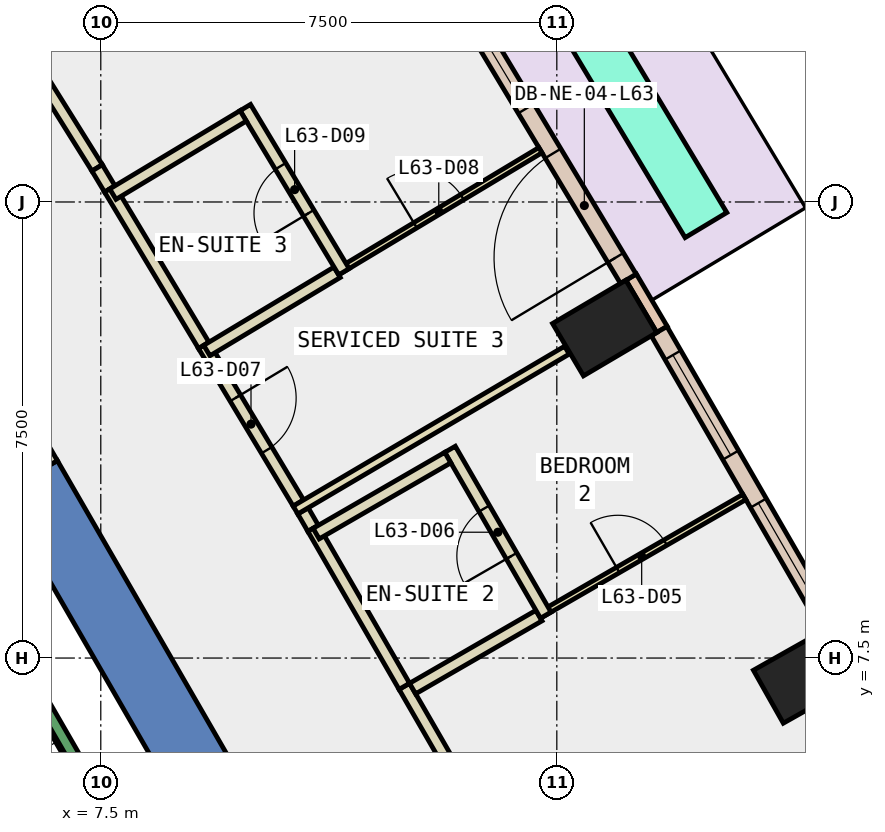
"""IFC4 building model, lengths in metres.
Left out: names, types, materials, properties, quantities, classifications, styles, units other than length and angle.
Written with IfcOpenShell. Run it as: python <this file> out.ifc"""

import sys

from ifc_helpers import new_model, si_unit, direction, frame, frame_2d, origin, origin_2d, place, context, subcontext, project, spatial, polyline, rectangle, outline, extrude, element, fill, save


model = new_model("IFC4")
c1 = context("Model", 3, precision=1e-05, world=origin(), true_north=direction((0.0, 1.0)))
c2 = subcontext(c1, "Body", "Model", "MODEL_VIEW")
j1 = project(units=[si_unit("LENGTHUNIT", "METRE"), si_unit("PLANEANGLEUNIT", "RADIAN")], contexts=[c1])
p1 = place(None, origin())
s1 = spatial("IfcSite", under=j1, at=p1, CompositionType="ELEMENT")
p2 = place(p1, origin())
s2 = spatial("IfcBuilding", under=s1, at=p2, CompositionType="ELEMENT")
p3 = place(p2, frame((0.0, 0.0, 273.8)))
s3 = spatial("IfcBuildingStorey", under=s2, at=p3, CompositionType="ELEMENT", Elevation=273.8)
for number, where, z_axis, x_axis in (
    (1, (19.089, 7.208, -0.34), (0.0, 0.0, 1.0), (-0.491, 0.871, 0.0)),
    (2, (15.787, 12.927, -0.34), (0.0, 0.0, 1.0), (-0.509, 0.861, 0.0)),
):
    element("IfcColumn", number, at=place(p3, frame(where, z_axis=z_axis, x_axis=x_axis)), inside=s3, PredefinedType="COLUMN", context=c2, shape_type="SweptSolid", body=[
        extrude(rectangle(XDim=1.0, YDim=1.4, at=origin_2d()), origin(), (0.0, 0.0, 1.0), 3.6),
    ])
p4 = place(p3, frame((0.0, 0.0, -0.34)))
e3 = element("IfcWall", 3, at=p4, inside=s3, PredefinedType="SHEAR", context=c2, shape_type="SweptSolid", body=[
    extrude(outline(polyline([(6.786, 10.747), (5.833, 10.197), (10.277, 2.5), (11.547, 2.5), (6.786, 10.747)])), origin(), (0.0, 0.0, 1.0), 3.6),
])
p5 = place(p3, frame((16.73, 12.904, 0.0), z_axis=(0.0, 0.0, 1.0), x_axis=(-0.508268432768, 0.861198699634, 0.0)))
e4 = element("IfcWall", 4, at=p5, inside=s3, PredefinedType="STANDARD", context=c2, shape_type="SweptSolid", body=[
    extrude(rectangle(XDim=1.0, YDim=0.2, at=frame_2d((0.5, 0.0))), origin(), (0.0, 0.0, 1.0), 3.26),
])
p6 = place(p3, frame((19.493, 8.008, 0.0), z_axis=(0.0, 0.0, 1.0), x_axis=(-0.49999685976, 0.866027216796, 0.0)))
e5 = element("IfcWall", 5, at=p6, inside=s3, PredefinedType="STANDARD", context=c2, shape_type="SweptSolid", body=[
    extrude(rectangle(XDim=5.622, YDim=0.3, at=frame_2d((2.811, 0.0))), origin(), (0.0, 0.0, 1.0), 3.26),
])
p7 = place(p6, frame((0.456, 0.0, 0.9)))
e6 = element("IfcOpeningElement", 6, at=p7, cuts=e5, PredefinedType="OPENING", context=c2, shape_type="SweptSolid", body=[
    extrude(rectangle(XDim=1.9, YDim=2.0, at=frame_2d((0.95, 1.0))), frame((0.0, 0.16, 0.0), z_axis=(0.0, -1.0, 0.0), x_axis=(1.0, 0.0, 0.0)), (0.0, 0.0, 1.0), 0.32),
])
p8 = place(p6, frame((3.267, 0.0, 0.9)))
e7 = element("IfcOpeningElement", 7, at=p8, cuts=e5, PredefinedType="OPENING", context=c2, shape_type="SweptSolid", body=[
    extrude(rectangle(XDim=1.9, YDim=2.0, at=frame_2d((0.95, 1.0))), frame((0.0, 0.16, 0.0), z_axis=(0.0, -1.0, 0.0), x_axis=(1.0, 0.0, 0.0)), (0.0, 0.0, 1.0), 0.32),
])
p9 = place(p3, frame((16.176, 13.737, 0.0), z_axis=(0.0, 0.0, 1.0), x_axis=(-0.515006791362, 0.857186096977, 0.0)))
e8 = element("IfcWall", 8, at=p9, inside=s3, PredefinedType="STANDARD", context=c2, shape_type="SweptSolid", body=[
    extrude(rectangle(XDim=5.619, YDim=0.3, at=frame_2d((2.81, 0.0))), origin(), (0.0, 0.0, 1.0), 3.26),
])
p10 = place(p9, frame((0.405, 0.0, 0.0)))
e9 = element("IfcOpeningElement", 9, at=p10, cuts=e8, PredefinedType="OPENING", context=c2, shape_type="SweptSolid", body=[
    extrude(rectangle(XDim=2.0, YDim=2.4, at=frame_2d((1.0, 1.2))), frame((0.0, 0.16, 0.0), z_axis=(0.0, -1.0, 0.0), x_axis=(1.0, 0.0, 0.0)), (0.0, 0.0, 1.0), 0.32),
])
p11 = place(p9, frame((3.265, 0.0, 0.9)))
e10 = element("IfcOpeningElement", 10, at=p11, cuts=e8, PredefinedType="OPENING", context=c2, shape_type="SweptSolid", body=[
    extrude(rectangle(XDim=1.9, YDim=2.0, at=frame_2d((0.95, 1.0))), frame((0.0, 0.16, 0.0), z_axis=(0.0, -1.0, 0.0), x_axis=(1.0, 0.0, 0.0)), (0.0, 0.0, 1.0), 0.32),
])
p12 = place(p3, frame((17.453, 14.62, 0.0), z_axis=(0.0, 0.0, 1.0), x_axis=(-0.514846755633, 0.857282227865, 0.0)))
e11 = element("IfcWall", 11, at=p12, inside=s3, PredefinedType="STANDARD", context=c2, shape_type="SweptSolid", body=[
    extrude(rectangle(XDim=5.421, YDim=0.8, at=frame_2d((2.71, 0.0))), origin(), (0.0, 0.0, 1.0), 0.8),
])
p13 = place(p3, frame((12.492, 7.035, 0.0), z_axis=(0.0, 0.0, 1.0), x_axis=(0.49999285859, -0.86602952684, 0.0)))
e12 = element("IfcWall", 12, at=p13, inside=s3, PredefinedType="PARTITIONING", context=c2, shape_type="SweptSolid", body=[
    extrude(rectangle(XDim=3.1, YDim=0.2, at=frame_2d((1.55, 0.0))), origin(), (0.0, 0.0, 1.0), 3.26),
])
p14 = place(p3, frame((10.826, 9.92, 0.0), z_axis=(0.0, 0.0, 1.0), x_axis=(0.5008910821, -0.865510325688, 0.0)))
e13 = element("IfcWall", 13, at=p14, inside=s3, PredefinedType="PARTITIONING", context=c2, shape_type="SweptSolid", body=[
    extrude(rectangle(XDim=0.332, YDim=0.2, at=frame_2d((0.166, 0.0))), origin(), (0.0, 0.0, 1.0), 3.26),
])
p15 = place(p3, frame((10.992, 9.633, 0.0), z_axis=(0.0, 0.0, 1.0), x_axis=(0.499990139034, -0.866031096941, 0.0)))
e14 = element("IfcWall", 14, at=p15, inside=s3, PredefinedType="PARTITIONING", context=c2, shape_type="SweptSolid", body=[
    extrude(rectangle(XDim=3.0, YDim=0.2, at=frame_2d((1.5, 0.0))), origin(), (0.0, 0.0, 1.0), 3.26),
])
p16 = place(p3, frame((9.192, 12.643, 0.0), z_axis=(0.0, 0.0, 1.0), x_axis=(0.51491096884, -0.857243660909, 0.0)))
e15 = element("IfcWall", 15, at=p16, inside=s3, PredefinedType="PARTITIONING", context=c2, shape_type="SweptSolid", body=[
    extrude(rectangle(XDim=3.026, YDim=0.2, at=frame_2d((1.513, 0.0))), origin(), (0.0, 0.0, 1.0), 3.26),
])
p17 = place(p16, frame((1.012, 0.0, 0.0)))
e16 = element("IfcOpeningElement", 16, at=p17, cuts=e15, PredefinedType="OPENING", context=c2, shape_type="SweptSolid", body=[
    extrude(rectangle(XDim=1.0, YDim=2.1, at=frame_2d((0.5, 1.05))), frame((0.0, 0.11, 0.0), z_axis=(0.0, -1.0, 0.0), x_axis=(1.0, 0.0, 0.0)), (0.0, 0.0, 1.0), 0.22),
])
p18 = place(p3, frame((4.085, 20.929, 0.0), z_axis=(0.0, 0.0, 1.0), x_axis=(0.530002406791, -0.847996137253, 0.0)))
e17 = element("IfcWall", 17, at=p18, inside=s3, PredefinedType="PARTITIONING", context=c2, shape_type="SweptSolid", body=[
    extrude(rectangle(XDim=6.33, YDim=0.2, at=frame_2d((3.165, 0.0))), origin(), (0.0, 0.0, 1.0), 3.26),
])
p19 = place(p3, frame((7.44, 15.561, 0.0), z_axis=(0.0, 0.0, 1.0), x_axis=(0.514229456049, -0.857652649114, 0.0)))
e18 = element("IfcWall", 18, at=p19, inside=s3, PredefinedType="PARTITIONING", context=c2, shape_type="SweptSolid", body=[
    extrude(rectangle(XDim=0.405, YDim=0.2, at=frame_2d((0.202, 0.0))), origin(), (0.0, 0.0, 1.0), 3.26),
])
p20 = place(p3, frame((7.648, 15.214, 0.0), z_axis=(0.0, 0.0, 1.0), x_axis=(0.515118014871, -0.857119262854, 0.0)))
e19 = element("IfcWall", 19, at=p20, inside=s3, PredefinedType="PARTITIONING", context=c2, shape_type="SweptSolid", body=[
    extrude(rectangle(XDim=3.0, YDim=0.2, at=frame_2d((1.5, 0.0))), origin(), (0.0, 0.0, 1.0), 3.26),
])
p21 = place(p3, frame((14.707, 8.198, 0.0), z_axis=(0.0, 0.0, 1.0), x_axis=(0.865995823051, 0.500051231833, 0.0)))
e20 = element("IfcWall", 20, at=p21, inside=s3, PredefinedType="PARTITIONING", context=c2, shape_type="SweptSolid", body=[
    extrude(rectangle(XDim=3.899, YDim=0.1, at=frame_2d((1.95, 0.0))), origin(), (0.0, 0.0, 1.0), 3.26),
])
p22 = place(p21, frame((1.5, 0.0, 0.0)))
e21 = element("IfcOpeningElement", 21, at=p22, cuts=e20, PredefinedType="OPENING", context=c2, shape_type="SweptSolid", body=[
    extrude(rectangle(XDim=0.9, YDim=2.1, at=frame_2d((0.45, 1.05))), frame((0.0, 0.06, 0.0), z_axis=(0.0, -1.0, 0.0), x_axis=(1.0, 0.0, 0.0)), (0.0, 0.0, 1.0), 0.12),
])
p23 = place(p3, frame((12.628, 6.998, 0.0), z_axis=(0.0, 0.0, 1.0), x_axis=(0.866100915363, 0.499869187296, 0.0)))
e22 = element("IfcWall", 22, at=p23, inside=s3, PredefinedType="PARTITIONING", context=c2, shape_type="SweptSolid", body=[
    extrude(rectangle(XDim=2.401, YDim=0.2, at=frame_2d((1.2, 0.0))), origin(), (0.0, 0.0, 1.0), 3.26),
])
p24 = place(p3, frame((14.818, 8.205, 0.0), z_axis=(0.0, 0.0, 1.0), x_axis=(-0.499807449307, 0.866136544441, 0.0)))
e23 = element("IfcWall", 23, at=p24, inside=s3, PredefinedType="PARTITIONING", context=c2, shape_type="SweptSolid", body=[
    extrude(rectangle(XDim=3.15, YDim=0.2, at=frame_2d((1.575, 0.0))), origin(), (0.0, 0.0, 1.0), 3.26),
])
p25 = place(p24, frame((1.125, 0.0, 0.0)))
e24 = element("IfcOpeningElement", 24, at=p25, cuts=e23, PredefinedType="OPENING", context=c2, shape_type="SweptSolid", body=[
    extrude(rectangle(XDim=0.9, YDim=2.1, at=frame_2d((0.45, 1.05))), frame((0.0, 0.11, 0.0), z_axis=(0.0, -1.0, 0.0), x_axis=(1.0, 0.0, 0.0)), (0.0, 0.0, 1.0), 0.22),
])
p26 = place(p3, frame((13.207, 10.796, 0.0), z_axis=(0.0, 0.0, 1.0), x_axis=(-0.866022959057, -0.500004234368, 0.0)))
e25 = element("IfcWall", 25, at=p26, inside=s3, PredefinedType="PARTITIONING", context=c2, shape_type="SweptSolid", body=[
    extrude(rectangle(XDim=2.5, YDim=0.2, at=frame_2d((1.25, 0.0))), origin(), (0.0, 0.0, 1.0), 3.26),
])
p27 = place(p3, frame((10.702, 9.934, 0.0), z_axis=(0.0, 0.0, 1.0), x_axis=(0.861684553056, 0.507444313225, 0.0)))
e26 = element("IfcWall", 26, at=p27, inside=s3, PredefinedType="PARTITIONING", context=c2, shape_type="SweptSolid", body=[
    extrude(rectangle(XDim=5.181, YDim=0.15, at=frame_2d((2.59, 0.0))), origin(), (0.0, 0.0, 1.0), 3.26),
])
p28 = place(p3, frame((11.387, 13.844, 0.0), z_axis=(0.0, 0.0, 1.0), x_axis=(0.857238721908, 0.514919191389, 0.0)))
e27 = element("IfcWall", 27, at=p28, inside=s3, PredefinedType="PARTITIONING", context=c2, shape_type="SweptSolid", body=[
    extrude(rectangle(XDim=3.9, YDim=0.1, at=frame_2d((1.95, 0.0))), origin(), (0.0, 0.0, 1.0), 3.26),
])
p29 = place(p28, frame((1.5, 0.0, 0.0)))
e28 = element("IfcOpeningElement", 28, at=p29, cuts=e27, PredefinedType="OPENING", context=c2, shape_type="SweptSolid", body=[
    extrude(rectangle(XDim=0.9, YDim=2.1, at=frame_2d((0.45, 1.05))), frame((0.0, 0.06, 0.0), z_axis=(0.0, -1.0, 0.0), x_axis=(1.0, 0.0, 0.0)), (0.0, 0.0, 1.0), 0.12),
])
p30 = place(p3, frame((9.244, 12.557, 0.0), z_axis=(0.0, 0.0, 1.0), x_axis=(0.857268798444, 0.514869116586, 0.0)))
e29 = element("IfcWall", 29, at=p30, inside=s3, PredefinedType="PARTITIONING", context=c2, shape_type="SweptSolid", body=[
    extrude(rectangle(XDim=2.5, YDim=0.2, at=frame_2d((1.25, 0.0))), origin(), (0.0, 0.0, 1.0), 3.26),
])
p31 = place(p3, frame((11.499, 13.853, 0.0), z_axis=(0.0, 0.0, 1.0), x_axis=(-0.514985817066, 0.857198698214, 0.0)))
e30 = element("IfcWall", 30, at=p31, inside=s3, PredefinedType="PARTITIONING", context=c2, shape_type="SweptSolid", body=[
    extrude(rectangle(XDim=3.15, YDim=0.2, at=frame_2d((1.575, 0.0))), origin(), (0.0, 0.0, 1.0), 3.26),
])
p32 = place(p31, frame((1.125, 0.0, 0.0)))
e31 = element("IfcOpeningElement", 31, at=p32, cuts=e30, PredefinedType="OPENING", context=c2, shape_type="SweptSolid", body=[
    extrude(rectangle(XDim=0.9, YDim=2.1, at=frame_2d((0.45, 1.05))), frame((0.0, 0.11, 0.0), z_axis=(0.0, -1.0, 0.0), x_axis=(1.0, 0.0, 0.0)), (0.0, 0.0, 1.0), 0.22),
])
p33 = place(p3, frame((9.842, 16.416, 0.0), z_axis=(0.0, 0.0, 1.0), x_axis=(-0.857268798444, -0.514869116586, 0.0)))
e32 = element("IfcWall", 32, at=p33, inside=s3, PredefinedType="PARTITIONING", context=c2, shape_type="SweptSolid", body=[
    extrude(rectangle(XDim=2.5, YDim=0.2, at=frame_2d((1.25, 0.0))), origin(), (0.0, 0.0, 1.0), 3.26),
])
p34 = place(p3, frame((6.699, 10.697, 0.0), z_axis=(0.0, 0.0, 1.0), x_axis=(-0.499914839587, 0.866074565589, 0.0)))
e33 = element("IfcWall", 33, at=p34, inside=s3, PredefinedType="PARTITIONING", context=c2, shape_type="SweptSolid", body=[
    extrude(rectangle(XDim=1.794, YDim=0.2, at=frame_2d((0.897, 0.0))), origin(), (0.0, 0.0, 1.0), 2.4),
])
p35 = place(p34, frame((0.397, 0.0, 0.0)))
e34 = element("IfcOpeningElement", 34, at=p35, cuts=e33, PredefinedType="OPENING", context=c2, shape_type="SweptSolid", body=[
    extrude(rectangle(XDim=1.0, YDim=2.1, at=frame_2d((0.5, 1.05))), frame((0.0, 0.11, 0.0), z_axis=(0.0, -1.0, 0.0), x_axis=(1.0, 0.0, 0.0)), (0.0, 0.0, 1.0), 0.22),
])
p36 = place(p3, frame((8.48, 3.412, 0.0), z_axis=(0.0, 0.0, 1.0), x_axis=(-0.499978703459, 0.866037698999, 0.0)))
e35 = element("IfcWall", 35, at=p36, inside=s3, PredefinedType="STANDARD", context=c2, shape_type="SweptSolid", body=[
    extrude(rectangle(XDim=6.9, YDim=0.2, at=frame_2d((3.45, 0.0))), origin(), (0.0, 0.0, 1.0), 3.26),
])
p37 = place(p7, origin())
e36 = element("IfcWindow", 36, at=p37, inside=s3, PartitioningType="SINGLE_PANEL", PredefinedType="WINDOW", context=c2, shape_type="SweptSolid", body=[
    extrude(rectangle(XDim=1.9, YDim=2.0, at=frame_2d((0.95, 1.0))), frame((0.0, 0.03, 0.0), z_axis=(0.0, -1.0, 0.0), x_axis=(1.0, 0.0, 0.0)), (0.0, 0.0, 1.0), 0.06),
])
fill(e6, e36)
p38 = place(p8, origin())
e37 = element("IfcWindow", 37, at=p38, inside=s3, PartitioningType="SINGLE_PANEL", PredefinedType="WINDOW", context=c2, shape_type="SweptSolid", body=[
    extrude(rectangle(XDim=1.9, YDim=2.0, at=frame_2d((0.95, 1.0))), frame((0.0, 0.03, 0.0), z_axis=(0.0, -1.0, 0.0), x_axis=(1.0, 0.0, 0.0)), (0.0, 0.0, 1.0), 0.06),
])
fill(e7, e37)
p39 = place(p10, origin())
e38 = element("IfcDoor", 38, at=p39, inside=s3, OperationType="SLIDING_TO_LEFT", PredefinedType="DOOR", context=c2, shape_type="SweptSolid", body=[
    extrude(rectangle(XDim=2.0, YDim=2.4, at=frame_2d((1.0, 1.2))), frame((0.0, 0.025, 0.0), z_axis=(0.0, -1.0, 0.0), x_axis=(1.0, 0.0, 0.0)), (0.0, 0.0, 1.0), 0.05),
])
fill(e9, e38)
p40 = place(p11, origin())
e39 = element("IfcWindow", 39, at=p40, inside=s3, PartitioningType="SINGLE_PANEL", PredefinedType="WINDOW", context=c2, shape_type="SweptSolid", body=[
    extrude(rectangle(XDim=1.9, YDim=2.0, at=frame_2d((0.95, 1.0))), frame((0.0, 0.03, 0.0), z_axis=(0.0, -1.0, 0.0), x_axis=(1.0, 0.0, 0.0)), (0.0, 0.0, 1.0), 0.06),
])
fill(e10, e39)
p41 = place(p22, origin())
e40 = element("IfcDoor", 40, at=p41, inside=s3, OperationType="SINGLE_SWING_LEFT", PredefinedType="DOOR", context=c2, shape_type="SweptSolid", body=[
    extrude(rectangle(XDim=0.9, YDim=2.1, at=frame_2d((0.45, 1.05))), frame((0.0, 0.025, 0.0), z_axis=(0.0, -1.0, 0.0), x_axis=(1.0, 0.0, 0.0)), (0.0, 0.0, 1.0), 0.05),
])
fill(e21, e40)
p42 = place(p25, origin())
e41 = element("IfcDoor", 41, at=p42, inside=s3, OperationType="SINGLE_SWING_RIGHT", PredefinedType="DOOR", context=c2, shape_type="SweptSolid", body=[
    extrude(rectangle(XDim=0.9, YDim=2.1, at=frame_2d((0.45, 1.05))), frame((0.0, 0.025, 0.0), z_axis=(0.0, -1.0, 0.0), x_axis=(1.0, 0.0, 0.0)), (0.0, 0.0, 1.0), 0.05),
])
fill(e24, e41)
p43 = place(p17, origin())
e42 = element("IfcDoor", 42, at=p43, inside=s3, OperationType="SINGLE_SWING_LEFT", PredefinedType="DOOR", context=c2, shape_type="SweptSolid", body=[
    extrude(rectangle(XDim=1.0, YDim=2.1, at=frame_2d((0.5, 1.05))), frame((0.0, 0.025, 0.0), z_axis=(0.0, -1.0, 0.0), x_axis=(1.0, 0.0, 0.0)), (0.0, 0.0, 1.0), 0.05),
])
fill(e16, e42)
p44 = place(p29, origin())
e43 = element("IfcDoor", 43, at=p44, inside=s3, OperationType="SINGLE_SWING_LEFT", PredefinedType="DOOR", context=c2, shape_type="SweptSolid", body=[
    extrude(rectangle(XDim=0.9, YDim=2.1, at=frame_2d((0.45, 1.05))), frame((0.0, 0.025, 0.0), z_axis=(0.0, -1.0, 0.0), x_axis=(1.0, 0.0, 0.0)), (0.0, 0.0, 1.0), 0.05),
])
fill(e28, e43)
p45 = place(p32, origin())
e44 = element("IfcDoor", 44, at=p45, inside=s3, OperationType="SINGLE_SWING_LEFT", PredefinedType="DOOR", context=c2, shape_type="SweptSolid", body=[
    extrude(rectangle(XDim=0.9, YDim=2.1, at=frame_2d((0.45, 1.05))), frame((0.0, 0.025, 0.0), z_axis=(0.0, -1.0, 0.0), x_axis=(1.0, 0.0, 0.0)), (0.0, 0.0, 1.0), 0.05),
])
fill(e31, e44)
save(model, sys.argv[1])
